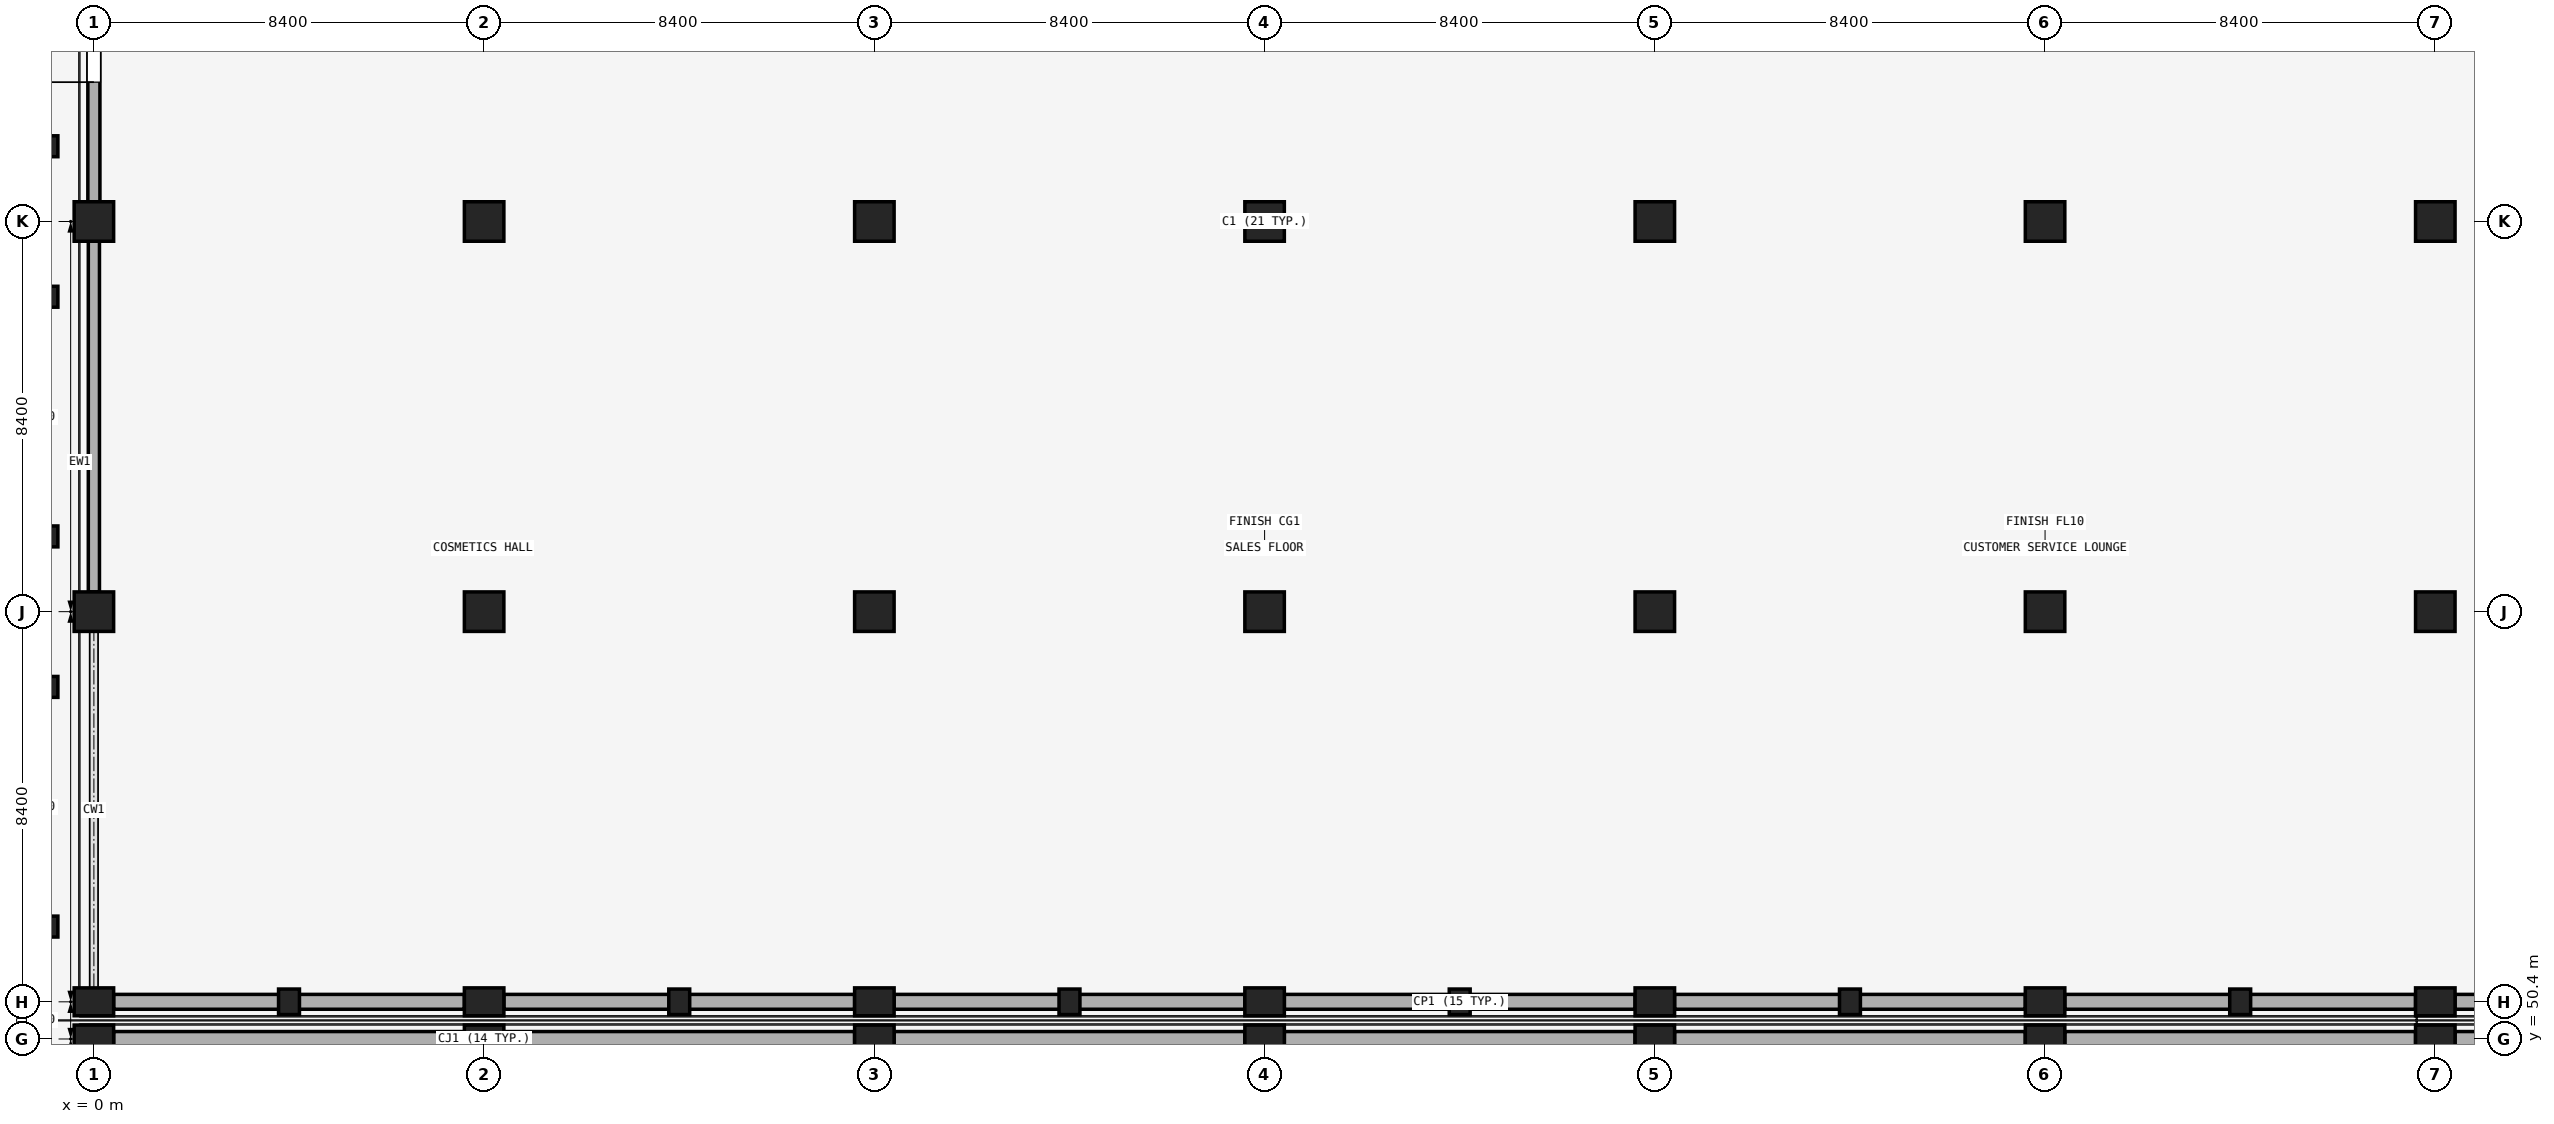
"""IFC4 building model, lengths in metres.
Left out: names, types, materials, properties, quantities, classifications, styles, units other than length and angle.
Written with IfcOpenShell. Run it as: python <this file> out.ifc"""

import sys

from ifc_helpers import new_model, si_unit, direction, frame, frame_2d, origin, origin_2d, place, context, subcontext, project, spatial, rectangle, extrude, element, fill, save


model = new_model("IFC4")
c1 = context("Model", 3, precision=1e-05, world=origin(), true_north=direction((0.0, 1.0)))
c2 = subcontext(c1, "Body", "Model", "MODEL_VIEW")
j1 = project(units=[si_unit("LENGTHUNIT", "METRE"), si_unit("PLANEANGLEUNIT", "RADIAN")], contexts=[c1])
p1 = place(None, origin())
s1 = spatial("IfcSite", under=j1, at=p1, CompositionType="ELEMENT")
p2 = place(p1, origin())
s2 = spatial("IfcBuilding", under=s1, at=p2, CompositionType="ELEMENT")
p3 = place(p2, origin())
s3 = spatial("IfcBuildingStorey", under=s2, at=p3, CompositionType="ELEMENT", Elevation=0.0)
for number, where, z_axis, x_axis in (
    (1, (0.0, 51.2, 0.0), (0.0, 0.0, 1.0), (0.0, 1.0, 0.0)),
    (2, (8.4, 51.2, 0.0), (0.0, 0.0, 1.0), (0.0, 1.0, 0.0)),
    (3, (16.8, 51.2, 0.0), (0.0, 0.0, 1.0), (0.0, 1.0, 0.0)),
    (4, (25.2, 51.2, 0.0), (0.0, 0.0, 1.0), (0.0, 1.0, 0.0)),
    (5, (33.6, 51.2, 0.0), (0.0, 0.0, 1.0), (0.0, 1.0, 0.0)),
    (6, (42.0, 51.2, 0.0), (0.0, 0.0, 1.0), (0.0, 1.0, 0.0)),
    (7, (50.4, 51.2, 0.0), (0.0, 0.0, 1.0), (0.0, 1.0, 0.0)),
):
    element("IfcColumn", number, at=place(p3, frame(where, z_axis=z_axis, x_axis=x_axis)), inside=s3, PredefinedType="COLUMN", context=c2, shape_type="SweptSolid", body=[
        extrude(rectangle(XDim=0.6, YDim=0.85, at=origin_2d()), origin(), (0.0, 0.0, 1.0), 5.4),
    ])
for number, where, z_axis, x_axis in (
    (8, (0.0, 59.6, 0.0), (0.0, 0.0, 1.0), (1.0, 0.0, 0.0)),
    (9, (8.4, 59.6, 0.0), (0.0, 0.0, 1.0), (1.0, 0.0, 0.0)),
    (10, (16.8, 59.6, 0.0), (0.0, 0.0, 1.0), (1.0, 0.0, 0.0)),
    (11, (25.2, 59.6, 0.0), (0.0, 0.0, 1.0), (1.0, 0.0, 0.0)),
    (12, (33.6, 59.6, 0.0), (0.0, 0.0, 1.0), (1.0, 0.0, 0.0)),
    (13, (42.0, 59.6, 0.0), (0.0, 0.0, 1.0), (1.0, 0.0, 0.0)),
    (14, (50.4, 59.6, 0.0), (0.0, 0.0, 1.0), (1.0, 0.0, 0.0)),
    (15, (0.0, 68.0, 0.0), (0.0, 0.0, 1.0), (1.0, 0.0, 0.0)),
    (16, (8.4, 68.0, 0.0), (0.0, 0.0, 1.0), (1.0, 0.0, 0.0)),
    (17, (16.8, 68.0, 0.0), (0.0, 0.0, 1.0), (1.0, 0.0, 0.0)),
    (18, (25.2, 68.0, 0.0), (0.0, 0.0, 1.0), (1.0, 0.0, 0.0)),
    (19, (33.6, 68.0, 0.0), (0.0, 0.0, 1.0), (1.0, 0.0, 0.0)),
    (20, (42.0, 68.0, 0.0), (0.0, 0.0, 1.0), (1.0, 0.0, 0.0)),
    (21, (50.4, 68.0, 0.0), (0.0, 0.0, 1.0), (1.0, 0.0, 0.0)),
):
    element("IfcColumn", number, at=place(p3, frame(where, z_axis=z_axis, x_axis=x_axis)), inside=s3, PredefinedType="COLUMN", context=c2, shape_type="SweptSolid", body=[
        extrude(rectangle(XDim=0.85, YDim=0.85, at=origin_2d()), origin(), (0.0, 0.0, 1.0), 5.4),
    ])
for number, where, z_axis, x_axis in (
    (22, (0.0, 50.4, 0.0), (0.0, 0.0, 1.0), (0.0, 1.0, 0.0)),
    (23, (8.4, 50.4, 0.0), (0.0, 0.0, 1.0), (0.0, 1.0, 0.0)),
    (24, (16.8, 50.4, 0.0), (0.0, 0.0, 1.0), (0.0, 1.0, 0.0)),
    (25, (25.2, 50.4, 0.0), (0.0, 0.0, 1.0), (0.0, 1.0, 0.0)),
    (26, (33.6, 50.4, 0.0), (0.0, 0.0, 1.0), (0.0, 1.0, 0.0)),
    (27, (42.0, 50.4, 0.0), (0.0, 0.0, 1.0), (0.0, 1.0, 0.0)),
    (28, (50.4, 50.4, 0.0), (0.0, 0.0, 1.0), (0.0, 1.0, 0.0)),
):
    element("IfcColumn", number, at=place(p3, frame(where, z_axis=z_axis, x_axis=x_axis)), inside=s3, PredefinedType="COLUMN", context=c2, shape_type="SweptSolid", body=[
        extrude(rectangle(XDim=0.6, YDim=0.85, at=origin_2d()), origin(), (0.0, 0.0, 1.0), 5.4),
    ])
for number, where, z_axis, x_axis in (
    (29, (4.2, 51.2, 0.0), (0.0, 0.0, 1.0), (1.0, 0.0, 0.0)),
    (30, (12.6, 51.2, 0.0), (0.0, 0.0, 1.0), (1.0, 0.0, 0.0)),
    (31, (21.0, 51.2, 0.0), (0.0, 0.0, 1.0), (1.0, 0.0, 0.0)),
    (32, (29.4, 51.2, 0.0), (0.0, 0.0, 1.0), (1.0, 0.0, 0.0)),
    (33, (37.8, 51.2, 0.0), (0.0, 0.0, 1.0), (1.0, 0.0, 0.0)),
    (34, (46.2, 51.2, 0.0), (0.0, 0.0, 1.0), (1.0, 0.0, 0.0)),
    (35, (-1.05, 52.82, 0.0), (0.0, 0.0, 1.0), (0.0, 1.0, 0.0)),
    (36, (-1.05, 57.98, 0.0), (0.0, 0.0, 1.0), (0.0, 1.0, 0.0)),
    (37, (-1.05, 61.22, 0.0), (0.0, 0.0, 1.0), (0.0, 1.0, 0.0)),
    (38, (-1.05, 66.38, 0.0), (0.0, 0.0, 1.0), (0.0, 1.0, 0.0)),
    (39, (-1.05, 69.62, 0.0), (0.0, 0.0, 1.0), (0.0, 1.0, 0.0)),
):
    element("IfcColumn", number, at=place(p3, frame(where, z_axis=z_axis, x_axis=x_axis)), inside=s3, PredefinedType="PILASTER", context=c2, shape_type="SweptSolid", body=[
        extrude(rectangle(XDim=0.45, YDim=0.55, at=origin_2d()), origin(), (0.0, 0.0, 1.0), 5.4),
    ])
for number, where, z_axis, x_axis in (
    (40, (0.425, 51.2, 0.0), (0.0, 0.0, 1.0), (1.0, 0.0, 0.0)),
    (41, (8.825, 51.2, 0.0), (0.0, 0.0, 1.0), (1.0, 0.0, 0.0)),
):
    element("IfcWall", number, at=place(p3, frame(where, z_axis=z_axis, x_axis=x_axis)), inside=s3, PredefinedType="SOLIDWALL", context=c2, shape_type="SweptSolid", body=[
        extrude(rectangle(XDim=7.55, YDim=0.32, at=frame_2d((3.775, 0.0))), origin(), (0.0, 0.0, 1.0), 4.35),
    ])
p4 = place(p3, frame((17.225, 51.2, 0.0), z_axis=(0.0, 0.0, 1.0), x_axis=(1.0, 0.0, 0.0)))
e42 = element("IfcWall", 42, at=p4, inside=s3, PredefinedType="SOLIDWALL", context=c2, shape_type="SweptSolid", body=[
    extrude(rectangle(XDim=7.55, YDim=0.32, at=frame_2d((3.775, 0.0))), origin(), (0.0, 0.0, 1.0), 4.35),
])
for number, where, z_axis, x_axis in (
    (43, (25.625, 51.2, 0.0), (0.0, 0.0, 1.0), (1.0, 0.0, 0.0)),
    (44, (34.025, 51.2, 0.0), (0.0, 0.0, 1.0), (1.0, 0.0, 0.0)),
    (45, (42.425, 51.2, 0.0), (0.0, 0.0, 1.0), (1.0, 0.0, 0.0)),
    (46, (50.825, 51.2, 0.0), (0.0, 0.0, 1.0), (1.0, 0.0, 0.0)),
):
    element("IfcWall", number, at=place(p3, frame(where, z_axis=z_axis, x_axis=x_axis)), inside=s3, PredefinedType="SOLIDWALL", context=c2, shape_type="SweptSolid", body=[
        extrude(rectangle(XDim=7.55, YDim=0.32, at=frame_2d((3.775, 0.0))), origin(), (0.0, 0.0, 1.0), 4.35),
    ])
p5 = place(p3, frame((0.0, 60.025, 0.0), z_axis=(0.0, 0.0, 1.0), x_axis=(0.0, 1.0, 0.0)))
e47 = element("IfcWall", 47, at=p5, inside=s3, PredefinedType="SOLIDWALL", context=c2, shape_type="SweptSolid", body=[
    extrude(rectangle(XDim=7.55, YDim=0.24, at=frame_2d((3.775, 0.0))), origin(), (0.0, 0.0, 1.0), 4.35),
])
p6 = place(p3, frame((0.0, 68.425, 0.0), z_axis=(0.0, 0.0, 1.0), x_axis=(0.0, 1.0, 0.0)))
e48 = element("IfcWall", 48, at=p6, inside=s3, PredefinedType="SOLIDWALL", context=c2, shape_type="SweptSolid", body=[
    extrude(rectangle(XDim=7.55, YDim=0.26, at=frame_2d((3.775, 0.0))), origin(), (0.0, 0.0, 1.0), 4.35),
])
p7 = place(p6, frame((2.575, 0.0, 0.0)))
e49 = element("IfcOpeningElement", 49, at=p7, cuts=e48, PredefinedType="OPENING", context=c2, shape_type="SweptSolid", body=[
    extrude(rectangle(XDim=2.4, YDim=2.6, at=frame_2d((1.2, 1.3))), frame((0.0, 0.14, 0.0), z_axis=(0.0, -1.0, 0.0), x_axis=(1.0, 0.0, 0.0)), (0.0, 0.0, 1.0), 0.28),
])
for number, where, z_axis, x_axis in (
    (50, (0.425, 50.4, 0.0), (0.0, 0.0, 1.0), (1.0, 0.0, 0.0)),
    (51, (8.825, 50.4, 0.0), (0.0, 0.0, 1.0), (1.0, 0.0, 0.0)),
):
    element("IfcWall", number, at=place(p3, frame(where, z_axis=z_axis, x_axis=x_axis)), inside=s3, PredefinedType="SOLIDWALL", context=c2, shape_type="SweptSolid", body=[
        extrude(rectangle(XDim=7.55, YDim=0.32, at=frame_2d((3.775, 0.0))), origin(), (0.0, 0.0, 1.0), 4.33),
    ])
p8 = place(p3, frame((17.225, 50.4, 0.0), z_axis=(0.0, 0.0, 1.0), x_axis=(1.0, 0.0, 0.0)))
e52 = element("IfcWall", 52, at=p8, inside=s3, PredefinedType="SOLIDWALL", context=c2, shape_type="SweptSolid", body=[
    extrude(rectangle(XDim=7.55, YDim=0.32, at=frame_2d((3.775, 0.0))), origin(), (0.0, 0.0, 1.0), 4.33),
])
for number, where, z_axis, x_axis in (
    (53, (25.625, 50.4, 0.0), (0.0, 0.0, 1.0), (1.0, 0.0, 0.0)),
    (54, (34.025, 50.4, 0.0), (0.0, 0.0, 1.0), (1.0, 0.0, 0.0)),
    (55, (42.425, 50.4, 0.0), (0.0, 0.0, 1.0), (1.0, 0.0, 0.0)),
    (56, (50.825, 50.4, 0.0), (0.0, 0.0, 1.0), (1.0, 0.0, 0.0)),
):
    element("IfcWall", number, at=place(p3, frame(where, z_axis=z_axis, x_axis=x_axis)), inside=s3, PredefinedType="SOLIDWALL", context=c2, shape_type="SweptSolid", body=[
        extrude(rectangle(XDim=7.55, YDim=0.32, at=frame_2d((3.775, 0.0))), origin(), (0.0, 0.0, 1.0), 4.33),
    ])
p9 = place(p7, origin())
e57 = element("IfcDoor", 57, at=p9, inside=s3, OperationType="DOUBLE_DOOR_SINGLE_SWING", PredefinedType="DOOR", context=c2, shape_type="SweptSolid", body=[
    extrude(rectangle(XDim=2.4, YDim=2.6, at=frame_2d((1.2, 1.3))), frame((0.0, 0.025, 0.0), z_axis=(0.0, -1.0, 0.0), x_axis=(1.0, 0.0, 0.0)), (0.0, 0.0, 1.0), 0.05),
])
fill(e49, e57)
save(model, sys.argv[1])
